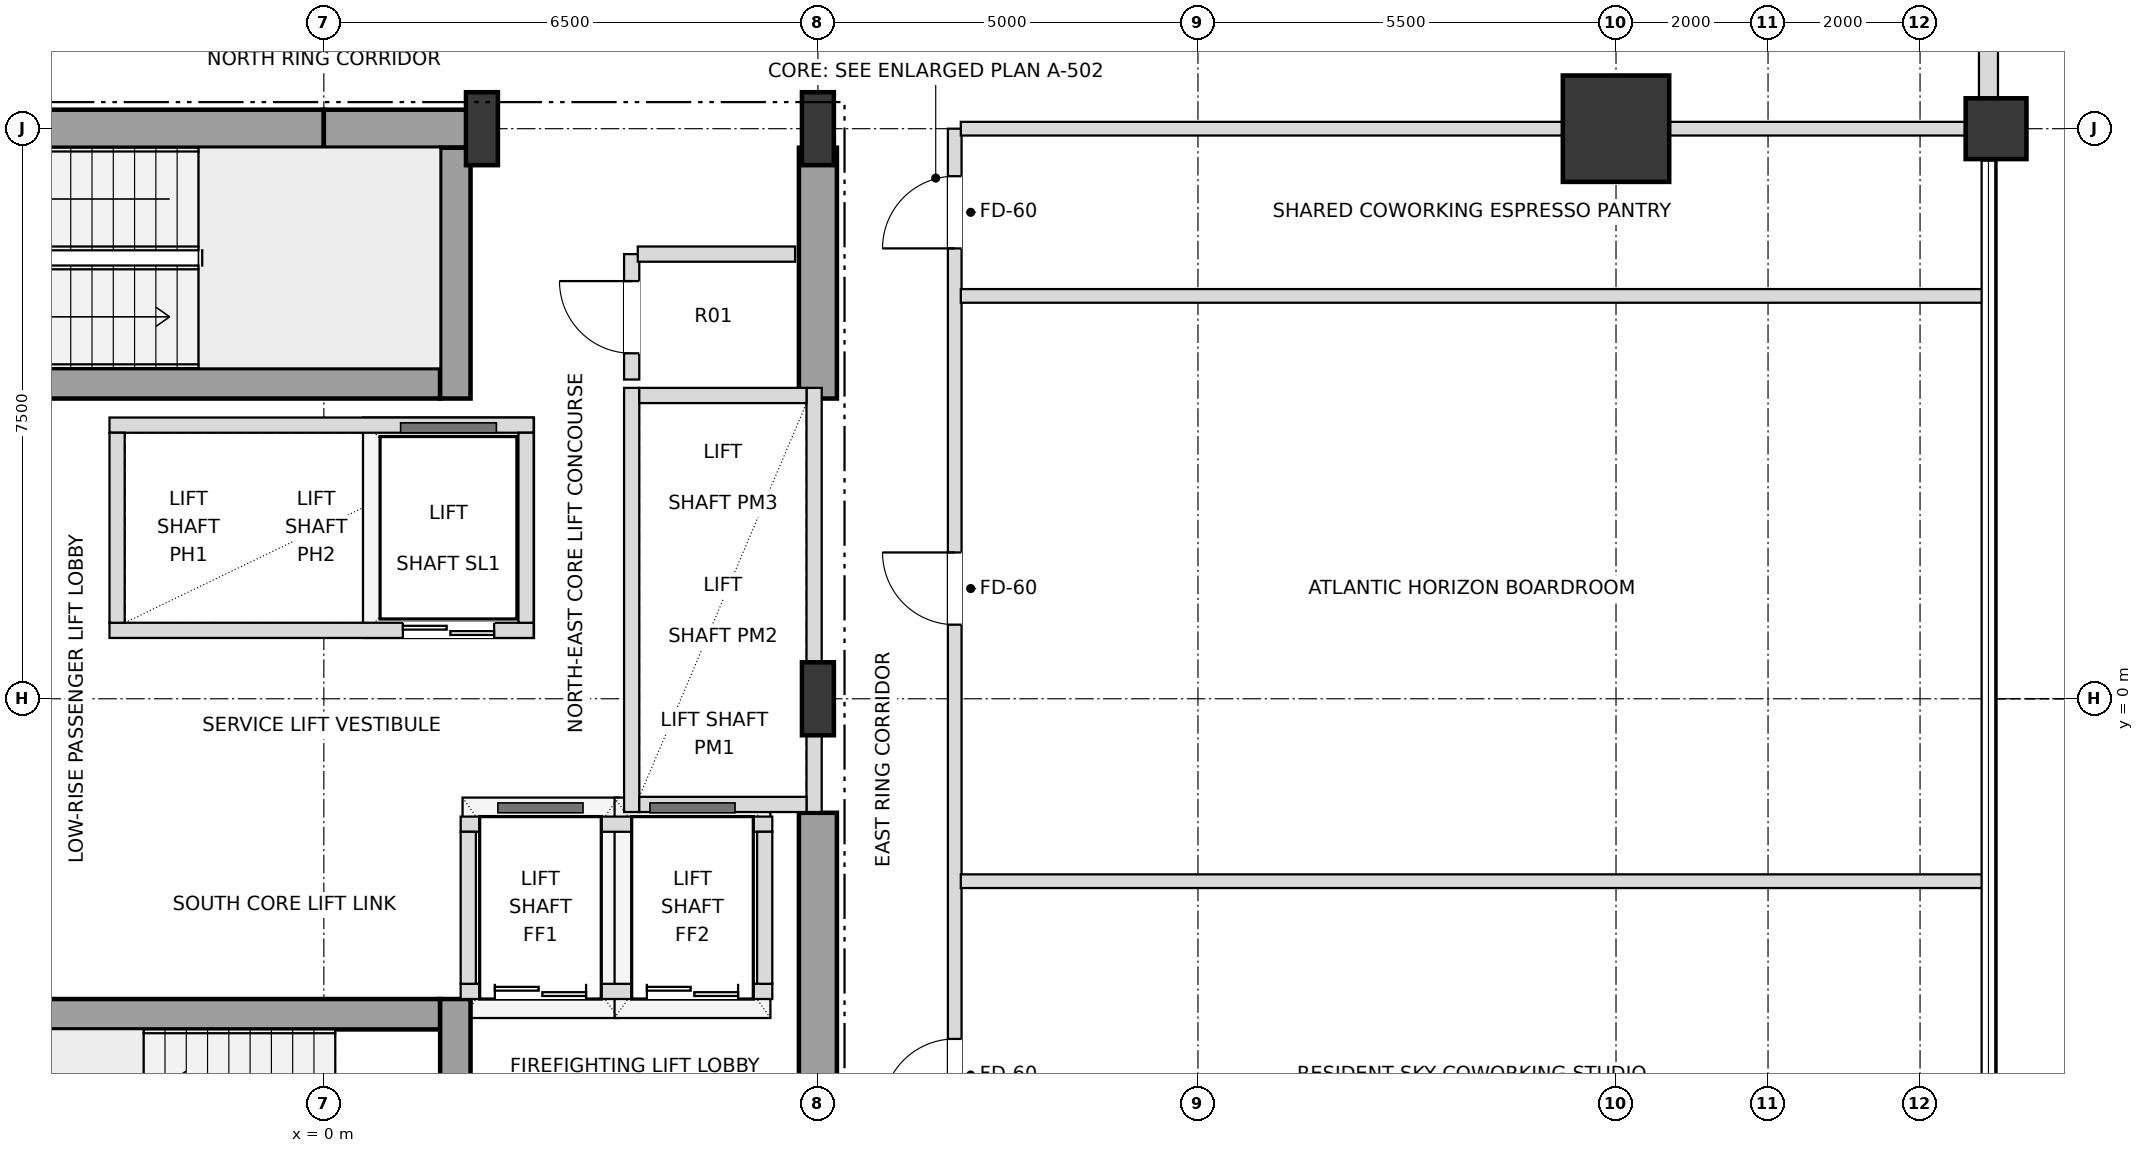
"""IFC4 building model, lengths in metres.
Left out: names, types, materials, properties, quantities, classifications, styles, units other than length and angle.
Written with IfcOpenShell. Run it as: python <this file> out.ifc"""

import sys

from ifc_helpers import new_model, si_unit, direction, frame, frame_2d, origin, origin_2d, place, context, subcontext, project, spatial, rectangle, i_section, extrude, element, fill, save


model = new_model("IFC4")
c1 = context("Model", 3, precision=1e-05, world=origin(), true_north=direction((0.0, 1.0)))
c2 = subcontext(c1, "Body", "Model", "MODEL_VIEW")
j1 = project(units=[si_unit("LENGTHUNIT", "METRE"), si_unit("PLANEANGLEUNIT", "RADIAN")], contexts=[c1])
p1 = place(None, origin())
s1 = spatial("IfcSite", under=j1, at=p1, CompositionType="ELEMENT")
p2 = place(p1, origin())
s2 = spatial("IfcBuilding", under=s1, at=p2, CompositionType="ELEMENT")
p3 = place(p2, frame((0.0, 0.0, 82.8)))
s3 = spatial("IfcBuildingStorey", under=s2, at=p3, CompositionType="ELEMENT", Elevation=82.8)
for number, where, z_axis, x_axis in (
    (1, (6.5, 0.0, 0.0), (0.0, 0.0, 1.0), (1.0, 0.0, 0.0)),
    (2, (2.08, 7.5, 0.0), (0.0, 0.0, 1.0), (1.0, 0.0, 0.0)),
    (3, (6.5, 7.5, 0.0), (0.0, 0.0, 1.0), (1.0, 0.0, 0.0)),
):
    element("IfcColumn", number, at=place(p3, frame(where, z_axis=z_axis, x_axis=x_axis)), inside=s3, PredefinedType="COLUMN", context=c2, shape_type="SweptSolid", body=[
        extrude(i_section(OverallWidth=0.42, OverallDepth=0.96, WebThickness=0.022, FlangeThickness=0.034, at=origin_2d()), origin(), (0.0, 0.0, 1.0), 3.6),
    ])
p4 = place(p3, frame((17.0, 7.5, 0.0), z_axis=(0.0, 0.0, 1.0), x_axis=(1.0, 0.0, 0.0)))
e4 = element("IfcColumn", 4, at=p4, inside=s3, PredefinedType="USERDEFINED", context=c2, shape_type="SweptSolid", body=[
    extrude(rectangle(XDim=1.4, YDim=1.4, at=origin_2d()), origin(), (0.0, 0.0, 1.0), 3.6),
])
p5 = place(p3, frame((22.0, 7.5, 0.0), z_axis=(0.0, 0.0, 1.0), x_axis=(1.0, 0.0, 0.0)))
e5 = element("IfcColumn", 5, at=p5, inside=s3, PredefinedType="COLUMN", context=c2, shape_type="SweptSolid", body=[
    extrude(rectangle(XDim=0.8, YDim=0.8, at=origin_2d()), origin(), (0.0, 0.0, 1.0), 3.6),
])
p6 = place(p3, frame((21.9, 7.895, 0.0), z_axis=(0.0, 0.0, 1.0), x_axis=(0.0, 1.0, 0.0)))
e6 = element("IfcWall", 6, at=p6, inside=s3, PredefinedType="SOLIDWALL", context=c2, shape_type="SweptSolid", body=[
    extrude(rectangle(XDim=4.71, YDim=0.25, at=frame_2d((2.355, 0.0))), origin(), (0.0, 0.0, 1.0), 2.736),
])
p7 = place(p6, frame((1.455, 0.0, 0.72)))
e7 = element("IfcOpeningElement", 7, at=p7, cuts=e6, PredefinedType="OPENING", context=c2, shape_type="SweptSolid", body=[
    extrude(rectangle(XDim=1.8, YDim=1.68, at=frame_2d((0.9, 0.84))), frame((0.0, 0.135, 0.0), z_axis=(0.0, -1.0, 0.0), x_axis=(1.0, 0.0, 0.0)), (0.0, 0.0, 1.0), 0.27),
])
p8 = place(p3, frame((-6.75, 7.5, 0.0), z_axis=(0.0, 0.0, 1.0), x_axis=(1.0, 0.0, 0.0)))
e8 = element("IfcWall", 8, at=p8, inside=s3, PredefinedType="SHEAR", context=c2, shape_type="SweptSolid", body=[
    extrude(rectangle(XDim=6.75, YDim=0.5, at=frame_2d((3.375, 0.0))), origin(), (0.0, 0.0, 1.0), 3.38),
])
p9 = place(p8, frame((1.65, 0.0, 0.0)))
e9 = element("IfcOpeningElement", 9, at=p9, cuts=e8, PredefinedType="OPENING", context=c2, shape_type="SweptSolid", body=[
    extrude(rectangle(XDim=1.05, YDim=2.15, at=frame_2d((0.525, 1.075))), frame((0.0, 0.26, 0.0), z_axis=(0.0, -1.0, 0.0), x_axis=(1.0, 0.0, 0.0)), (0.0, 0.0, 1.0), 0.52),
])
p10 = place(p3, frame((0.0, 7.5, 0.0), z_axis=(0.0, 0.0, 1.0), x_axis=(1.0, 0.0, 0.0)))
e10 = element("IfcWall", 10, at=p10, inside=s3, PredefinedType="SHEAR", context=c2, shape_type="SweptSolid", body=[
    extrude(rectangle(XDim=2.08, YDim=0.5, at=frame_2d((1.04, 0.0))), origin(), (0.0, 0.0, 1.0), 3.38),
])
p11 = place(p3, frame((6.5, -7.25, 0.0), z_axis=(0.0, 0.0, 1.0), x_axis=(0.0, 1.0, 0.0)))
e11 = element("IfcWall", 11, at=p11, inside=s3, PredefinedType="SHEAR", context=c2, shape_type="SweptSolid", body=[
    extrude(rectangle(XDim=5.75, YDim=0.5, at=frame_2d((2.875, 0.0))), origin(), (0.0, 0.0, 1.0), 3.38),
])
p12 = place(p11, frame((0.85, 0.0, 0.0)))
e12 = element("IfcOpeningElement", 12, at=p12, cuts=e11, PredefinedType="OPENING", context=c2, shape_type="SweptSolid", body=[
    extrude(rectangle(XDim=1.05, YDim=2.15, at=frame_2d((0.525, 1.075))), frame((0.0, 0.26, 0.0), z_axis=(0.0, -1.0, 0.0), x_axis=(1.0, 0.0, 0.0)), (0.0, 0.0, 1.0), 0.52),
])
p13 = place(p3, frame((6.5, 3.95, 0.0), z_axis=(0.0, 0.0, 1.0), x_axis=(0.0, 1.0, 0.0)))
e13 = element("IfcWall", 13, at=p13, inside=s3, PredefinedType="SHEAR", context=c2, shape_type="SweptSolid", body=[
    extrude(rectangle(XDim=3.3, YDim=0.5, at=frame_2d((1.65, 0.0))), origin(), (0.0, 0.0, 1.0), 3.38),
])
p14 = place(p3, frame((-6.25, -4.15, 0.0), z_axis=(0.0, 0.0, 1.0), x_axis=(1.0, 0.0, 0.0)))
e14 = element("IfcWall", 14, at=p14, inside=s3, PredefinedType="SHEAR", context=c2, shape_type="SweptSolid", body=[
    extrude(rectangle(XDim=7.78, YDim=0.4, at=frame_2d((3.89, 0.0))), origin(), (0.0, 0.0, 1.0), 3.38),
])
p15 = place(p3, frame((1.73, -7.25, 0.0), z_axis=(0.0, 0.0, 1.0), x_axis=(0.0, 1.0, 0.0)))
e15 = element("IfcWall", 15, at=p15, inside=s3, PredefinedType="SHEAR", context=c2, shape_type="SweptSolid", body=[
    extrude(rectangle(XDim=3.3, YDim=0.4, at=frame_2d((1.65, 0.0))), origin(), (0.0, 0.0, 1.0), 3.38),
])
p16 = place(p15, frame((0.9, 0.0, 0.0)))
e16 = element("IfcOpeningElement", 16, at=p16, cuts=e15, PredefinedType="OPENING", context=c2, shape_type="SweptSolid", body=[
    extrude(rectangle(XDim=1.05, YDim=2.15, at=frame_2d((0.525, 1.075))), frame((0.0, 0.21, 0.0), z_axis=(0.0, -1.0, 0.0), x_axis=(1.0, 0.0, 0.0)), (0.0, 0.0, 1.0), 0.42),
])
p17 = place(p3, frame((-5.55, 4.15, 0.0), z_axis=(0.0, 0.0, 1.0), x_axis=(1.0, 0.0, 0.0)))
e17 = element("IfcWall", 17, at=p17, inside=s3, PredefinedType="SHEAR", context=c2, shape_type="SweptSolid", body=[
    extrude(rectangle(XDim=7.08, YDim=0.4, at=frame_2d((3.54, 0.0))), origin(), (0.0, 0.0, 1.0), 3.38),
])
p18 = place(p3, frame((1.73, 3.95, 0.0), z_axis=(0.0, 0.0, 1.0), x_axis=(0.0, 1.0, 0.0)))
e18 = element("IfcWall", 18, at=p18, inside=s3, PredefinedType="SHEAR", context=c2, shape_type="SweptSolid", body=[
    extrude(rectangle(XDim=3.3, YDim=0.4, at=frame_2d((1.65, 0.0))), origin(), (0.0, 0.0, 1.0), 3.38),
])
p19 = place(p3, frame((4.05, -1.49, 0.0), z_axis=(0.0, 0.0, 1.0), x_axis=(0.0, 1.0, 0.0)))
e19 = element("IfcWall", 19, at=p19, inside=s3, PredefinedType="SOLIDWALL", context=c2, shape_type="SweptSolid", body=[
    extrude(rectangle(XDim=5.58, YDim=0.2, at=frame_2d((2.79, 0.0))), origin(), (0.0, 0.0, 1.0), 3.38),
])
p20 = place(p3, frame((6.45, -1.49, 0.0), z_axis=(0.0, 0.0, 1.0), x_axis=(0.0, 1.0, 0.0)))
e20 = element("IfcWall", 20, at=p20, inside=s3, PredefinedType="SOLIDWALL", context=c2, shape_type="SweptSolid", body=[
    extrude(rectangle(XDim=5.58, YDim=0.2, at=frame_2d((2.79, 0.0))), origin(), (0.0, 0.0, 1.0), 2.816),
])
for number, where, z_axis, x_axis in (
    (21, (4.15, -1.39, 0.0), (0.0, 0.0, 1.0), (1.0, 0.0, 0.0)),
    (22, (4.15, 3.99, 0.0), (0.0, 0.0, 1.0), (1.0, 0.0, 0.0)),
):
    element("IfcWall", number, at=place(p3, frame(where, z_axis=z_axis, x_axis=x_axis)), inside=s3, PredefinedType="SOLIDWALL", context=c2, shape_type="SweptSolid", body=[
        extrude(rectangle(XDim=2.2, YDim=0.2, at=frame_2d((1.1, 0.0))), origin(), (0.0, 0.0, 1.0), 3.38),
    ])
p21 = place(p3, frame((-2.82, 0.9, 0.0), z_axis=(0.0, 0.0, 1.0), x_axis=(1.0, 0.0, 0.0)))
e23 = element("IfcWall", 23, at=p21, inside=s3, PredefinedType="SOLIDWALL", context=c2, shape_type="SweptSolid", body=[
    extrude(rectangle(XDim=5.58, YDim=0.2, at=frame_2d((2.79, 0.0))), origin(), (0.0, 0.0, 1.0), 3.38),
])
p22 = place(p21, frame((3.86, 0.0, 0.0)))
e24 = element("IfcOpeningElement", 24, at=p22, cuts=e23, PredefinedType="OPENING", context=c2, shape_type="SweptSolid", body=[
    extrude(rectangle(XDim=1.2, YDim=2.2, at=frame_2d((0.6, 1.1))), frame((0.0, 0.11, 0.0), z_axis=(0.0, -1.0, 0.0), x_axis=(1.0, 0.0, 0.0)), (0.0, 0.0, 1.0), 0.22),
])
p23 = place(p3, frame((-2.82, 3.6, 0.0), z_axis=(0.0, 0.0, 1.0), x_axis=(1.0, 0.0, 0.0)))
e25 = element("IfcWall", 25, at=p23, inside=s3, PredefinedType="SOLIDWALL", context=c2, shape_type="SweptSolid", body=[
    extrude(rectangle(XDim=5.58, YDim=0.2, at=frame_2d((2.79, 0.0))), origin(), (0.0, 0.0, 1.0), 3.38),
])
for number, where, z_axis, x_axis in (
    (26, (-2.72, 1.0, 0.0), (0.0, 0.0, 1.0), (0.0, 1.0, 0.0)),
    (27, (2.66, 1.0, 0.0), (0.0, 0.0, 1.0), (0.0, 1.0, 0.0)),
):
    element("IfcWall", number, at=place(p3, frame(where, z_axis=z_axis, x_axis=x_axis)), inside=s3, PredefinedType="SOLIDWALL", context=c2, shape_type="SweptSolid", body=[
        extrude(rectangle(XDim=2.5, YDim=0.2, at=frame_2d((1.25, 0.0))), origin(), (0.0, 0.0, 1.0), 3.38),
    ])
p24 = place(p3, frame((1.8, -3.85, 0.0), z_axis=(0.0, 0.0, 1.0), x_axis=(1.0, 0.0, 0.0)))
e28 = element("IfcWall", 28, at=p24, inside=s3, PredefinedType="SOLIDWALL", context=c2, shape_type="SweptSolid", body=[
    extrude(rectangle(XDim=4.1, YDim=0.2, at=frame_2d((2.05, 0.0))), origin(), (0.0, 0.0, 1.0), 3.38),
])
p25 = place(p24, frame((0.45, 0.0, 0.0)))
e29 = element("IfcOpeningElement", 29, at=p25, cuts=e28, PredefinedType="OPENING", context=c2, shape_type="SweptSolid", body=[
    extrude(rectangle(XDim=1.2, YDim=2.2, at=frame_2d((0.6, 1.1))), frame((0.0, 0.11, 0.0), z_axis=(0.0, -1.0, 0.0), x_axis=(1.0, 0.0, 0.0)), (0.0, 0.0, 1.0), 0.22),
])
p26 = place(p24, frame((2.45, 0.0, 0.0)))
e30 = element("IfcOpeningElement", 30, at=p26, cuts=e28, PredefinedType="OPENING", context=c2, shape_type="SweptSolid", body=[
    extrude(rectangle(XDim=1.2, YDim=2.2, at=frame_2d((0.6, 1.1))), frame((0.0, 0.11, 0.0), z_axis=(0.0, -1.0, 0.0), x_axis=(1.0, 0.0, 0.0)), (0.0, 0.0, 1.0), 0.22),
])
p27 = place(p3, frame((1.8, -1.65, 0.0), z_axis=(0.0, 0.0, 1.0), x_axis=(1.0, 0.0, 0.0)))
e31 = element("IfcWall", 31, at=p27, inside=s3, PredefinedType="SOLIDWALL", context=c2, shape_type="SweptSolid", body=[
    extrude(rectangle(XDim=4.1, YDim=0.2, at=frame_2d((2.05, 0.0))), origin(), (0.0, 0.0, 1.0), 3.38),
])
for number, where, z_axis, x_axis in (
    (32, (1.9, -3.75, 0.0), (0.0, 0.0, 1.0), (0.0, 1.0, 0.0)),
    (33, (5.8, -3.75, 0.0), (0.0, 0.0, 1.0), (0.0, 1.0, 0.0)),
):
    element("IfcWall", number, at=place(p3, frame(where, z_axis=z_axis, x_axis=x_axis)), inside=s3, PredefinedType="SOLIDWALL", context=c2, shape_type="SweptSolid", body=[
        extrude(rectangle(XDim=2.0, YDim=0.2, at=frame_2d((1.0, 0.0))), origin(), (0.0, 0.0, 1.0), 3.38),
    ])
p28 = place(p3, frame((4.05, 4.2, 0.0), z_axis=(0.0, 0.0, 1.0), x_axis=(0.0, 1.0, 0.0)))
e34 = element("IfcWall", 34, at=p28, inside=s3, PredefinedType="SOLIDWALL", context=c2, shape_type="SweptSolid", body=[
    extrude(rectangle(XDim=1.65, YDim=0.2, at=frame_2d((0.825, 0.0))), origin(), (0.0, 0.0, 1.0), 3.38),
])
p29 = place(p28, frame((0.345, 0.0, 0.0)))
e35 = element("IfcOpeningElement", 35, at=p29, cuts=e34, PredefinedType="OPENING", context=c2, shape_type="SweptSolid", body=[
    extrude(rectangle(XDim=0.95, YDim=2.15, at=frame_2d((0.475, 1.075))), frame((0.0, 0.11, 0.0), z_axis=(0.0, -1.0, 0.0), x_axis=(1.0, 0.0, 0.0)), (0.0, 0.0, 1.0), 0.22),
])
p30 = place(p3, frame((8.3, -7.5, 0.0), z_axis=(0.0, 0.0, 1.0), x_axis=(0.0, 1.0, 0.0)))
e36 = element("IfcWall", 36, at=p30, inside=s3, PredefinedType="PARTITIONING", context=c2, shape_type="SweptSolid", body=[
    extrude(rectangle(XDim=15.0, YDim=0.18, at=frame_2d((7.5, 0.0))), origin(), (0.0, 0.0, 1.0), 3.38),
])
p31 = place(p30, frame((2.075, 0.0, 0.0)))
e37 = element("IfcOpeningElement", 37, at=p31, cuts=e36, PredefinedType="OPENING", context=c2, shape_type="SweptSolid", body=[
    extrude(rectangle(XDim=0.95, YDim=2.15, at=frame_2d((0.475, 1.075))), frame((0.0, 0.1, 0.0), z_axis=(0.0, -1.0, 0.0), x_axis=(1.0, 0.0, 0.0)), (0.0, 0.0, 1.0), 0.2),
])
p32 = place(p30, frame((8.475, 0.0, 0.0)))
e38 = element("IfcOpeningElement", 38, at=p32, cuts=e36, PredefinedType="OPENING", context=c2, shape_type="SweptSolid", body=[
    extrude(rectangle(XDim=0.95, YDim=2.15, at=frame_2d((0.475, 1.075))), frame((0.0, 0.1, 0.0), z_axis=(0.0, -1.0, 0.0), x_axis=(1.0, 0.0, 0.0)), (0.0, 0.0, 1.0), 0.2),
])
p33 = place(p30, frame((13.425, 0.0, 0.0)))
e39 = element("IfcOpeningElement", 39, at=p33, cuts=e36, PredefinedType="OPENING", context=c2, shape_type="SweptSolid", body=[
    extrude(rectangle(XDim=0.95, YDim=2.15, at=frame_2d((0.475, 1.075))), frame((0.0, 0.1, 0.0), z_axis=(0.0, -1.0, 0.0), x_axis=(1.0, 0.0, 0.0)), (0.0, 0.0, 1.0), 0.2),
])
for number, where, z_axis, x_axis in (
    (40, (8.38, -2.4, 0.0), (0.0, 0.0, 1.0), (1.0, 0.0, 0.0)),
    (41, (8.38, 5.3, 0.0), (0.0, 0.0, 1.0), (1.0, 0.0, 0.0)),
):
    element("IfcWall", number, at=place(p3, frame(where, z_axis=z_axis, x_axis=x_axis)), inside=s3, PredefinedType="PARTITIONING", context=c2, shape_type="SweptSolid", body=[
        extrude(rectangle(XDim=13.44, YDim=0.18, at=frame_2d((6.72, 0.0))), origin(), (0.0, 0.0, 1.0), 2.816),
    ])
p34 = place(p3, frame((4.13, 5.85, 0.0), z_axis=(0.0, 0.0, 1.0), x_axis=(1.0, 0.0, 0.0)))
e42 = element("IfcWall", 42, at=p34, inside=s3, PredefinedType="SOLIDWALL", context=c2, shape_type="SweptSolid", body=[
    extrude(rectangle(XDim=2.07, YDim=0.2, at=frame_2d((1.035, 0.0))), origin(), (0.0, 0.0, 1.0), 3.38),
])
p35 = place(p3, frame((8.38, 7.5, 0.0), z_axis=(0.0, 0.0, 1.0), x_axis=(1.0, 0.0, 0.0)))
e43 = element("IfcWall", 43, at=p35, inside=s3, PredefinedType="PARTITIONING", context=c2, shape_type="SweptSolid", body=[
    extrude(rectangle(XDim=13.52, YDim=0.18, at=frame_2d((6.76, 0.0))), origin(), (0.0, 0.0, 1.0), 2.816),
])
p36 = place(p22, origin())
e44 = element("IfcDoor", 44, at=p36, inside=s3, OperationType="DOUBLE_DOOR_SLIDING", PredefinedType="DOOR", context=c2, shape_type="SweptSolid", body=[
    extrude(rectangle(XDim=1.2, YDim=2.2, at=frame_2d((0.6, 1.1))), frame((0.0, 0.025, 0.0), z_axis=(0.0, -1.0, 0.0), x_axis=(1.0, 0.0, 0.0)), (0.0, 0.0, 1.0), 0.05),
])
fill(e24, e44)
p37 = place(p25, origin())
e45 = element("IfcDoor", 45, at=p37, inside=s3, OperationType="DOUBLE_DOOR_SLIDING", PredefinedType="DOOR", context=c2, shape_type="SweptSolid", body=[
    extrude(rectangle(XDim=1.2, YDim=2.2, at=frame_2d((0.6, 1.1))), frame((0.0, 0.025, 0.0), z_axis=(0.0, -1.0, 0.0), x_axis=(1.0, 0.0, 0.0)), (0.0, 0.0, 1.0), 0.05),
])
fill(e29, e45)
p38 = place(p26, origin())
e46 = element("IfcDoor", 46, at=p38, inside=s3, OperationType="DOUBLE_DOOR_SLIDING", PredefinedType="DOOR", context=c2, shape_type="SweptSolid", body=[
    extrude(rectangle(XDim=1.2, YDim=2.2, at=frame_2d((0.6, 1.1))), frame((0.0, 0.025, 0.0), z_axis=(0.0, -1.0, 0.0), x_axis=(1.0, 0.0, 0.0)), (0.0, 0.0, 1.0), 0.05),
])
fill(e30, e46)
p39 = place(p29, origin())
e47 = element("IfcDoor", 47, at=p39, inside=s3, OperationType="SINGLE_SWING_RIGHT", PredefinedType="DOOR", context=c2, shape_type="SweptSolid", body=[
    extrude(rectangle(XDim=0.95, YDim=2.15, at=frame_2d((0.475, 1.075))), frame((0.0, 0.025, 0.0), z_axis=(0.0, -1.0, 0.0), x_axis=(1.0, 0.0, 0.0)), (0.0, 0.0, 1.0), 0.05),
])
fill(e35, e47)
p40 = place(p31, origin())
e48 = element("IfcDoor", 48, at=p40, inside=s3, OperationType="SINGLE_SWING_LEFT", PredefinedType="DOOR", context=c2, shape_type="SweptSolid", body=[
    extrude(rectangle(XDim=0.95, YDim=2.15, at=frame_2d((0.475, 1.075))), frame((0.0, 0.025, 0.0), z_axis=(0.0, -1.0, 0.0), x_axis=(1.0, 0.0, 0.0)), (0.0, 0.0, 1.0), 0.05),
])
fill(e37, e48)
p41 = place(p32, origin())
e49 = element("IfcDoor", 49, at=p41, inside=s3, OperationType="SINGLE_SWING_RIGHT", PredefinedType="DOOR", context=c2, shape_type="SweptSolid", body=[
    extrude(rectangle(XDim=0.95, YDim=2.15, at=frame_2d((0.475, 1.075))), frame((0.0, 0.025, 0.0), z_axis=(0.0, -1.0, 0.0), x_axis=(1.0, 0.0, 0.0)), (0.0, 0.0, 1.0), 0.05),
])
fill(e38, e49)
p42 = place(p33, origin())
e50 = element("IfcDoor", 50, at=p42, inside=s3, OperationType="SINGLE_SWING_LEFT", PredefinedType="DOOR", context=c2, shape_type="SweptSolid", body=[
    extrude(rectangle(XDim=0.95, YDim=2.15, at=frame_2d((0.475, 1.075))), frame((0.0, 0.025, 0.0), z_axis=(0.0, -1.0, 0.0), x_axis=(1.0, 0.0, 0.0)), (0.0, 0.0, 1.0), 0.05),
])
fill(e39, e50)
save(model, sys.argv[1])
